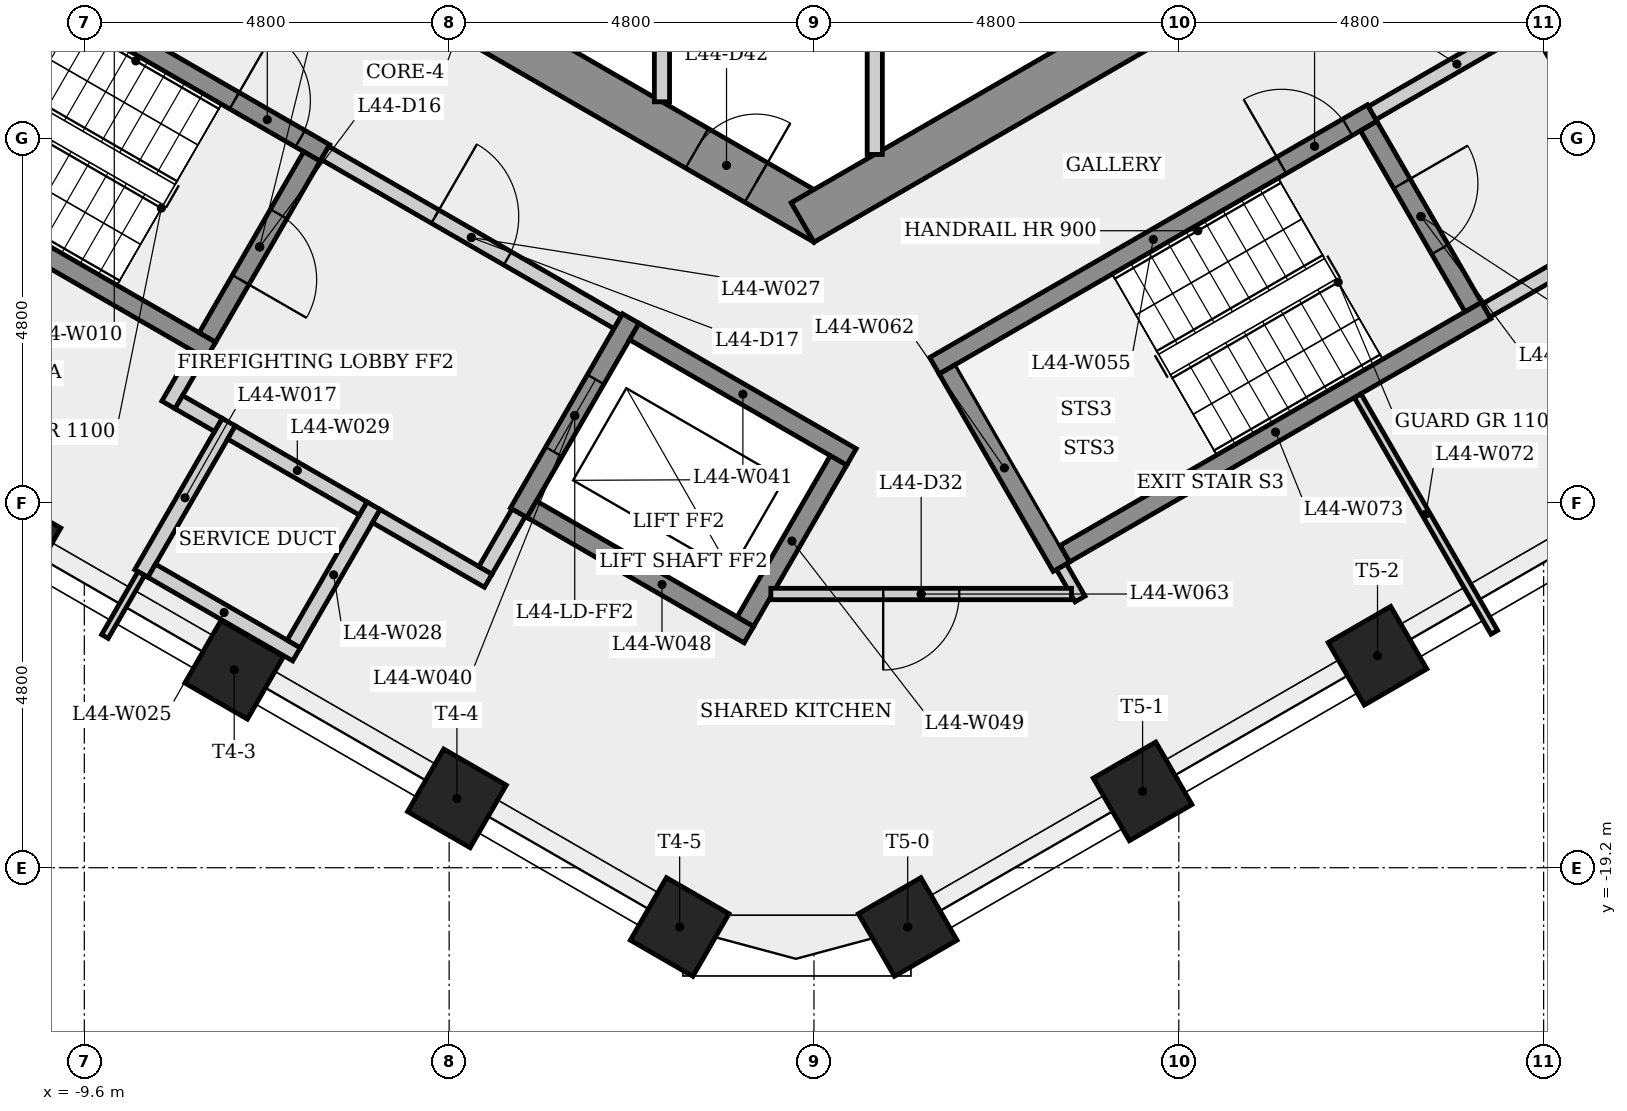
"""IFC4 building model, lengths in metres.
Left out: names, types, materials, properties, quantities, classifications, styles, units other than length and angle.
Written with IfcOpenShell. Run it as: python <this file> out.ifc"""

import sys

from ifc_helpers import new_model, si_unit, direction, frame, frame_2d, origin, origin_2d, place, context, subcontext, project, spatial, rectangle, extrude, element, fill, save


model = new_model("IFC4")
c1 = context("Model", 3, precision=1e-05, world=origin(), true_north=direction((0.0, 1.0)))
c2 = subcontext(c1, "Body", "Model", "MODEL_VIEW")
j1 = project(units=[si_unit("LENGTHUNIT", "METRE"), si_unit("PLANEANGLEUNIT", "RADIAN")], contexts=[c1])
p1 = place(None, origin())
s1 = spatial("IfcSite", under=j1, at=p1, CompositionType="ELEMENT")
p2 = place(p1, origin())
s2 = spatial("IfcBuilding", under=s1, at=p2, CompositionType="ELEMENT")
p3 = place(p2, frame((0.0, 0.0, 166.3)))
s3 = spatial("IfcBuildingStorey", under=s2, at=p3, CompositionType="ELEMENT", Elevation=166.3)
p4 = place(p3, frame((-9.35, -5.225, 0.0), z_axis=(0.0, 0.0, 1.0), x_axis=(0.866023993627, -0.500002442456, 0.0)))
e1 = element("IfcWall", 1, at=p4, inside=s3, PredefinedType="SHEAR", context=c2, shape_type="SweptSolid", body=[
    extrude(rectangle(XDim=10.97, YDim=0.6, at=frame_2d((5.485, 0.0))), origin(), (0.0, 0.0, 1.0), 3.4),
])
p5 = place(p4, frame((3.891, 0.0, 0.0)))
e2 = element("IfcOpeningElement", 2, at=p5, cuts=e1, PredefinedType="OPENING", context=c2, shape_type="SweptSolid", body=[
    extrude(rectangle(XDim=0.9, YDim=2.1, at=frame_2d((0.45, 1.05))), frame((0.0, 0.31, 0.0), z_axis=(0.0, -1.0, 0.0), x_axis=(1.0, 0.0, 0.0)), (0.0, 0.0, 1.0), 0.62),
])
p6 = place(p4, frame((9.018, 0.0, 0.0)))
e3 = element("IfcOpeningElement", 3, at=p6, cuts=e1, PredefinedType="OPENING", context=c2, shape_type="SweptSolid", body=[
    extrude(rectangle(XDim=0.9, YDim=2.1, at=frame_2d((0.45, 1.05))), frame((0.0, 0.31, 0.0), z_axis=(0.0, -1.0, 0.0), x_axis=(1.0, 0.0, 0.0)), (0.0, 0.0, 1.0), 0.62),
])
p7 = place(p3, frame((-0.15, -10.71, 0.0), z_axis=(0.0, 0.0, 1.0), x_axis=(0.866023993627, 0.500002442456, 0.0)))
e4 = element("IfcWall", 4, at=p7, inside=s3, PredefinedType="SHEAR", context=c2, shape_type="SweptSolid", body=[
    extrude(rectangle(XDim=10.97, YDim=0.6, at=frame_2d((5.485, 0.0))), origin(), (0.0, 0.0, 1.0), 3.4),
])
p8 = place(p7, frame((7.166, 0.0, 0.0)))
e5 = element("IfcOpeningElement", 5, at=p8, cuts=e4, PredefinedType="OPENING", context=c2, shape_type="SweptSolid", body=[
    extrude(rectangle(XDim=0.9, YDim=2.1, at=frame_2d((0.45, 1.05))), frame((0.0, 0.31, 0.0), z_axis=(0.0, -1.0, 0.0), x_axis=(1.0, 0.0, 0.0)), (0.0, 0.0, 1.0), 0.62),
])
for number, where, z_axis, x_axis in (
    (6, (-10.559, -14.904, 0.0), (0.0, 0.0, 1.0), (-0.5, -0.866, 0.0)),
    (7, (-7.628, -16.596, 0.0), (0.0, 0.0, 1.0), (-0.5, -0.866, 0.0)),
    (8, (-4.698, -18.288, 0.0), (0.0, 0.0, 1.0), (-0.5, -0.866, 0.0)),
    (9, (-1.767, -19.98, 0.0), (0.0, 0.0, 1.0), (-0.5, -0.866, 0.0)),
    (10, (1.233, -19.98, 0.0), (0.0, 0.0, 1.0), (0.5, -0.866, 0.0)),
    (11, (4.324, -18.195, 0.0), (0.0, 0.0, 1.0), (0.5, -0.866, 0.0)),
    (12, (7.414, -16.411, 0.0), (0.0, 0.0, 1.0), (0.5, -0.866, 0.0)),
):
    element("IfcColumn", number, at=place(p3, frame(where, z_axis=z_axis, x_axis=x_axis)), inside=s3, PredefinedType="COLUMN", context=c2, shape_type="SweptSolid", body=[
        extrude(rectangle(XDim=0.95, YDim=0.95, at=origin_2d()), origin(), (0.0, 0.0, 1.0), 3.4),
    ])
p9 = place(p3, frame((-11.977, -6.595, 0.0), z_axis=(0.0, 0.0, 1.0), x_axis=(0.866025499775, -0.499999833739, 0.0)))
e13 = element("IfcWall", 13, at=p9, inside=s3, PredefinedType="SHEAR", context=c2, shape_type="SweptSolid", body=[
    extrude(rectangle(XDim=6.4, YDim=0.25, at=frame_2d((3.2, 0.0))), origin(), (0.0, 0.0, 1.0), 3.05),
])
p10 = place(p9, frame((5.025, 0.0, 0.0)))
e14 = element("IfcOpeningElement", 14, at=p10, cuts=e13, PredefinedType="OPENING", context=c2, shape_type="SweptSolid", body=[
    extrude(rectangle(XDim=1.0, YDim=2.1, at=frame_2d((0.5, 1.05))), frame((0.0, 0.135, 0.0), z_axis=(0.0, -1.0, 0.0), x_axis=(1.0, 0.0, 0.0)), (0.0, 0.0, 1.0), 0.27),
])
p11 = place(p3, frame((-8.85, -15.329, 0.0), z_axis=(0.0, 0.0, 1.0), x_axis=(0.500077740698, 0.865980515519, 0.0)))
e15 = element("IfcWall", 15, at=p11, inside=s3, PredefinedType="PLUMBINGWALL", context=c2, shape_type="SweptSolid", body=[
    extrude(rectangle(XDim=2.3, YDim=0.2, at=frame_2d((1.15, 0.0))), origin(), (0.0, 0.0, 1.0), 3.05),
])
p12 = place(p3, frame((-8.85, -15.329, 0.0), z_axis=(0.0, 0.0, 1.0), x_axis=(-0.499950501706, -0.866053979752, 0.0)))
e16 = element("IfcWall", 16, at=p12, inside=s3, PredefinedType="PARTITIONING", context=c2, shape_type="SweptSolid", body=[
    extrude(rectangle(XDim=0.958, YDim=0.1, at=frame_2d((0.479, 0.0))), origin(), (0.0, 0.0, 1.0), 3.05),
])
p13 = place(p3, frame((-8.493, -13.11, 0.0), z_axis=(0.0, 0.0, 1.0), x_axis=(0.500067724834, 0.865986299303, 0.0)))
e17 = element("IfcWall", 17, at=p13, inside=s3, PredefinedType="PARTITIONING", context=c2, shape_type="SweptSolid", body=[
    extrude(rectangle(XDim=0.775, YDim=0.2, at=frame_2d((0.388, 0.0))), origin(), (0.0, 0.0, 1.0), 3.05),
])
p14 = place(p3, frame((-7.935, -12.393, 0.0), z_axis=(0.0, 0.0, 1.0), x_axis=(-0.866025499775, 0.499999833739, 0.0)))
e18 = element("IfcWall", 18, at=p14, inside=s3, PredefinedType="SHEAR", context=c2, shape_type="SweptSolid", body=[
    extrude(rectangle(XDim=6.4, YDim=0.25, at=frame_2d((3.2, 0.0))), origin(), (0.0, 0.0, 1.0), 3.05),
])
p15 = place(p3, frame((-7.836, -13.373, 0.0), z_axis=(0.0, 0.0, 1.0), x_axis=(-0.866232998003, 0.499640263761, 0.0)))
e19 = element("IfcWall", 19, at=p15, inside=s3, PredefinedType="PARTITIONING", context=c2, shape_type="SweptSolid", body=[
    extrude(rectangle(XDim=0.6, YDim=0.2, at=frame_2d((0.3, 0.0))), origin(), (0.0, 0.0, 1.0), 3.05),
])
p16 = place(p3, frame((-6.808, -16.392, 0.0), z_axis=(0.0, 0.0, 1.0), x_axis=(-0.866008176907, 0.50002983664, 0.0)))
e20 = element("IfcWall", 20, at=p16, inside=s3, PredefinedType="PLUMBINGWALL", context=c2, shape_type="SweptSolid", body=[
    extrude(rectangle(XDim=2.2, YDim=0.2, at=frame_2d((1.1, 0.0))), origin(), (0.0, 0.0, 1.0), 3.05),
])
p17 = place(p3, frame((-6.605, -9.841, 0.0), z_axis=(0.0, 0.0, 1.0), x_axis=(-0.499996545922, -0.866027397988, 0.0)))
e21 = element("IfcWall", 21, at=p17, inside=s3, PredefinedType="SHEAR", context=c2, shape_type="SweptSolid", body=[
    extrude(rectangle(XDim=2.75, YDim=0.25, at=frame_2d((1.375, 0.0))), origin(), (0.0, 0.0, 1.0), 3.05),
])
p18 = place(p17, frame((0.875, 0.0, 0.0)))
e22 = element("IfcOpeningElement", 22, at=p18, cuts=e21, PredefinedType="OPENING", context=c2, shape_type="SweptSolid", body=[
    extrude(rectangle(XDim=1.0, YDim=2.1, at=frame_2d((0.5, 1.05))), frame((0.0, 0.135, 0.0), z_axis=(0.0, -1.0, 0.0), x_axis=(1.0, 0.0, 0.0)), (0.0, 0.0, 1.0), 0.27),
])
p19 = place(p3, frame((-6.435, -9.795, 0.0), z_axis=(0.0, 0.0, 1.0), x_axis=(0.866012907634, -0.500021643343, 0.0)))
e23 = element("IfcWall", 23, at=p19, inside=s3, PredefinedType="PARTITIONING", context=c2, shape_type="SweptSolid", body=[
    extrude(rectangle(XDim=4.45, YDim=0.2, at=frame_2d((2.225, 0.0))), origin(), (0.0, 0.0, 1.0), 3.05),
])
p20 = place(p19, frame((1.675, 0.0, 0.0)))
e24 = element("IfcOpeningElement", 24, at=p20, cuts=e23, PredefinedType="OPENING", context=c2, shape_type="SweptSolid", body=[
    extrude(rectangle(XDim=1.1, YDim=2.1, at=frame_2d((0.55, 1.05))), frame((0.0, 0.11, 0.0), z_axis=(0.0, -1.0, 0.0), x_axis=(1.0, 0.0, 0.0)), (0.0, 0.0, 1.0), 0.22),
])
p21 = place(p3, frame((-5.795, -14.437, 0.0), z_axis=(0.0, 0.0, 1.0), x_axis=(-0.500027713859, -0.866009402589, 0.0)))
e25 = element("IfcWall", 25, at=p21, inside=s3, PredefinedType="PLUMBINGWALL", context=c2, shape_type="SweptSolid", body=[
    extrude(rectangle(XDim=2.1, YDim=0.2, at=frame_2d((1.05, 0.0))), origin(), (0.0, 0.0, 1.0), 3.05),
])
p22 = place(p3, frame((-5.931, -14.473, 0.0), z_axis=(0.0, 0.0, 1.0), x_axis=(-0.866041268327, 0.499972520799, 0.0)))
e26 = element("IfcWall", 26, at=p22, inside=s3, PredefinedType="PLUMBINGWALL", context=c2, shape_type="SweptSolid", body=[
    extrude(rectangle(XDim=2.0, YDim=0.2, at=frame_2d((1.0, 0.0))), origin(), (0.0, 0.0, 1.0), 3.05),
])
p23 = place(p3, frame((-4.286, -15.423, 0.0), z_axis=(0.0, 0.0, 1.0), x_axis=(-0.866025371046, 0.500000056704, 0.0)))
e27 = element("IfcWall", 27, at=p23, inside=s3, PredefinedType="PARTITIONING", context=c2, shape_type="SweptSolid", body=[
    extrude(rectangle(XDim=1.7, YDim=0.2, at=frame_2d((0.85, 0.0))), origin(), (0.0, 0.0, 1.0), 3.05),
])
p24 = place(p3, frame((-3.885, -14.529, 0.0), z_axis=(0.0, 0.0, 1.0), x_axis=(-0.499859285417, -0.866106630146, 0.0)))
e28 = element("IfcWall", 28, at=p24, inside=s3, PredefinedType="PARTITIONING", context=c2, shape_type="SweptSolid", body=[
    extrude(rectangle(XDim=0.875, YDim=0.2, at=frame_2d((0.438, 0.0))), origin(), (0.0, 0.0, 1.0), 3.05),
])
p25 = place(p3, frame((-2.41, -11.974, 0.0), z_axis=(0.0, 0.0, 1.0), x_axis=(-0.500001826776, -0.866024349092, 0.0)))
e29 = element("IfcWall", 29, at=p25, inside=s3, PredefinedType="SHEAR", context=c2, shape_type="SweptSolid", body=[
    extrude(rectangle(XDim=2.95, YDim=0.25, at=frame_2d((1.475, 0.0))), origin(), (0.0, 0.0, 1.0), 3.05),
])
p26 = place(p25, frame((0.925, 0.0, 0.0)))
e30 = element("IfcOpeningElement", 30, at=p26, cuts=e29, PredefinedType="OPENING", context=c2, shape_type="SweptSolid", body=[
    extrude(rectangle(XDim=1.1, YDim=2.1, at=frame_2d((0.55, 1.05))), frame((0.0, 0.135, 0.0), z_axis=(0.0, -1.0, 0.0), x_axis=(1.0, 0.0, 0.0)), (0.0, 0.0, 1.0), 0.27),
])
p27 = place(p3, frame((-2.364, -12.145, 0.0), z_axis=(0.0, 0.0, 1.0), x_axis=(0.866040211805, -0.499974350878, 0.0)))
e31 = element("IfcWall", 31, at=p27, inside=s3, PredefinedType="SHEAR", context=c2, shape_type="SweptSolid", body=[
    extrude(rectangle(XDim=3.3, YDim=0.25, at=frame_2d((1.65, 0.0))), origin(), (0.0, 0.0, 1.0), 3.05),
])
p28 = place(p3, frame((-2.0, -5.25, 0.0), z_axis=(0.0, 0.0, 1.0), x_axis=(0.0, -1.0, 0.0)))
e32 = element("IfcWall", 32, at=p28, inside=s3, PredefinedType="PARTITIONING", context=c2, shape_type="SweptSolid", body=[
    extrude(rectangle(XDim=3.872, YDim=0.2, at=frame_2d((1.936, 0.0))), origin(), (0.0, 0.0, 1.0), 3.05),
])
p29 = place(p3, frame((-0.856, -16.133, 0.0), z_axis=(0.0, 0.0, 1.0), x_axis=(-0.866021716278, 0.500006386895, 0.0)))
e33 = element("IfcWall", 33, at=p29, inside=s3, PredefinedType="SHEAR", context=c2, shape_type="SweptSolid", body=[
    extrude(rectangle(XDim=3.3, YDim=0.25, at=frame_2d((1.65, 0.0))), origin(), (0.0, 0.0, 1.0), 3.05),
])
p30 = place(p3, frame((-0.902, -15.962, 0.0), z_axis=(0.0, 0.0, 1.0), x_axis=(0.500061746146, 0.865989751695, 0.0)))
e34 = element("IfcWall", 34, at=p30, inside=s3, PredefinedType="SHEAR", context=c2, shape_type="SweptSolid", body=[
    extrude(rectangle(XDim=2.45, YDim=0.25, at=frame_2d((1.225, 0.0))), origin(), (0.0, 0.0, 1.0), 3.4),
])
p31 = place(p3, frame((0.8, -5.25, 0.0), z_axis=(0.0, 0.0, 1.0), x_axis=(0.0, -1.0, 0.0)))
e35 = element("IfcWall", 35, at=p31, inside=s3, PredefinedType="PARTITIONING", context=c2, shape_type="SweptSolid", body=[
    extrude(rectangle(XDim=4.565, YDim=0.2, at=frame_2d((2.282, 0.0))), origin(), (0.0, 0.0, 1.0), 3.05),
])
p32 = place(p3, frame((1.585, -12.595, 0.0), z_axis=(0.0, 0.0, 1.0), x_axis=(0.866036417653, 0.499980922934, 0.0)))
e36 = element("IfcWall", 36, at=p32, inside=s3, PredefinedType="SHEAR", context=c2, shape_type="SweptSolid", body=[
    extrude(rectangle(XDim=6.65, YDim=0.25, at=frame_2d((3.325, 0.0))), origin(), (0.0, 0.0, 1.0), 3.05),
])
p33 = place(p32, frame((5.275, 0.0, 0.0)))
e37 = element("IfcOpeningElement", 37, at=p33, cuts=e36, PredefinedType="OPENING", context=c2, shape_type="SweptSolid", body=[
    extrude(rectangle(XDim=1.0, YDim=2.1, at=frame_2d((0.5, 1.05))), frame((0.0, 0.135, 0.0), z_axis=(0.0, -1.0, 0.0), x_axis=(1.0, 0.0, 0.0)), (0.0, 0.0, 1.0), 0.27),
])
p34 = place(p3, frame((3.256, -15.239, 0.0), z_axis=(0.0, 0.0, 1.0), x_axis=(0.499937760689, -0.866061334686, 0.0)))
e38 = element("IfcWall", 38, at=p34, inside=s3, PredefinedType="PARTITIONING", context=c2, shape_type="SweptSolid", body=[
    extrude(rectangle(XDim=0.491, YDim=0.15, at=frame_2d((0.245, 0.0))), origin(), (0.0, 0.0, 1.0), 3.05),
])
p35 = place(p3, frame((3.256, -15.239, 0.0), z_axis=(0.0, 0.0, 1.0), x_axis=(-0.50002537861, 0.866010750942, 0.0)))
e39 = element("IfcWall", 39, at=p35, inside=s3, PredefinedType="SHEAR", context=c2, shape_type="SweptSolid", body=[
    extrude(rectangle(XDim=3.0, YDim=0.25, at=frame_2d((1.5, 0.0))), origin(), (0.0, 0.0, 1.0), 3.05),
])
p36 = place(p3, frame((3.388, -15.599, 0.0), z_axis=(0.0, 0.0, 1.0), x_axis=(-1.0, 0.0, 0.0)))
e40 = element("IfcWall", 40, at=p36, inside=s3, PredefinedType="PARTITIONING", context=c2, shape_type="SweptSolid", body=[
    extrude(rectangle(XDim=3.956, YDim=0.15, at=frame_2d((1.978, 0.0))), origin(), (0.0, 0.0, 1.0), 3.05),
])
p37 = place(p36, frame((1.478, 0.0, 0.0)))
e41 = element("IfcOpeningElement", 41, at=p37, cuts=e40, PredefinedType="OPENING", context=c2, shape_type="SweptSolid", body=[
    extrude(rectangle(XDim=1.0, YDim=2.1, at=frame_2d((0.5, 1.05))), frame((0.0, 0.085, 0.0), z_axis=(0.0, -1.0, 0.0), x_axis=(1.0, 0.0, 0.0)), (0.0, 0.0, 1.0), 0.17),
])
p38 = place(p3, frame((7.153, -12.989, 0.0), z_axis=(0.0, 0.0, 1.0), x_axis=(0.500002649256, -0.86602387423, 0.0)))
e42 = element("IfcWall", 42, at=p38, inside=s3, PredefinedType="PARTITIONING", context=c2, shape_type="SweptSolid", body=[
    extrude(rectangle(XDim=3.595, YDim=0.1, at=frame_2d((1.798, 0.0))), origin(), (0.0, 0.0, 1.0), 3.05),
])
p39 = place(p3, frame((3.301, -15.068, 0.0), z_axis=(0.0, 0.0, 1.0), x_axis=(0.866035036182, 0.499983315828, 0.0)))
e43 = element("IfcWall", 43, at=p39, inside=s3, PredefinedType="SHEAR", context=c2, shape_type="SweptSolid", body=[
    extrude(rectangle(XDim=6.4, YDim=0.25, at=frame_2d((3.2, 0.0))), origin(), (0.0, 0.0, 1.0), 3.05),
])
p40 = place(p3, frame((7.298, -9.441, 0.0), z_axis=(0.0, 0.0, 1.0), x_axis=(0.500034990121, -0.866005201286, 0.0)))
e44 = element("IfcWall", 44, at=p40, inside=s3, PredefinedType="SHEAR", context=c2, shape_type="SweptSolid", body=[
    extrude(rectangle(XDim=2.75, YDim=0.25, at=frame_2d((1.375, 0.0))), origin(), (0.0, 0.0, 1.0), 3.05),
])
p41 = place(p40, frame((0.875, 0.0, 0.0)))
e45 = element("IfcOpeningElement", 45, at=p41, cuts=e44, PredefinedType="OPENING", context=c2, shape_type="SweptSolid", body=[
    extrude(rectangle(XDim=1.0, YDim=2.1, at=frame_2d((0.5, 1.05))), frame((0.0, 0.135, 0.0), z_axis=(0.0, -1.0, 0.0), x_axis=(1.0, 0.0, 0.0)), (0.0, 0.0, 1.0), 0.27),
])
p42 = place(p3, frame((7.344, -9.27, 0.0), z_axis=(0.0, 0.0, 1.0), x_axis=(0.866005588531, 0.500034319456, 0.0)))
e46 = element("IfcWall", 46, at=p42, inside=s3, PredefinedType="PARTITIONING", context=c2, shape_type="SweptSolid", body=[
    extrude(rectangle(XDim=2.575, YDim=0.2, at=frame_2d((1.288, 0.0))), origin(), (0.0, 0.0, 1.0), 3.05),
])
p43 = place(p3, frame((9.537, -8.119, 0.0), z_axis=(0.0, 0.0, 1.0), x_axis=(0.499990139034, -0.866031096941, 0.0)))
e47 = element("IfcWall", 47, at=p43, inside=s3, PredefinedType="PARTITIONING", context=c2, shape_type="SweptSolid", body=[
    extrude(rectangle(XDim=3.0, YDim=0.2, at=frame_2d((1.5, 0.0))), origin(), (0.0, 0.0, 1.0), 3.05),
])
p44 = place(p43, frame((0.935, 0.0, 0.0)))
e48 = element("IfcOpeningElement", 48, at=p44, cuts=e47, PredefinedType="OPENING", context=c2, shape_type="SweptSolid", body=[
    extrude(rectangle(XDim=1.0, YDim=2.1, at=frame_2d((0.5, 1.05))), frame((0.0, 0.11, 0.0), z_axis=(0.0, -1.0, 0.0), x_axis=(1.0, 0.0, 0.0)), (0.0, 0.0, 1.0), 0.22),
])
p45 = place(p3, frame((10.901, -10.681, 0.0), z_axis=(0.0, 0.0, 1.0), x_axis=(-0.866007538022, -0.500030943131, 0.0)))
e49 = element("IfcWall", 49, at=p45, inside=s3, PredefinedType="PARTITIONING", context=c2, shape_type="SweptSolid", body=[
    extrude(rectangle(XDim=2.375, YDim=0.2, at=frame_2d((1.188, 0.0))), origin(), (0.0, 0.0, 1.0), 3.05),
])
p46 = place(p10, origin())
e50 = element("IfcDoor", 50, at=p46, inside=s3, OperationType="SINGLE_SWING_LEFT", PredefinedType="DOOR", context=c2, shape_type="SweptSolid", body=[
    extrude(rectangle(XDim=1.0, YDim=2.1, at=frame_2d((0.5, 1.05))), frame((0.0, 0.025, 0.0), z_axis=(0.0, -1.0, 0.0), x_axis=(1.0, 0.0, 0.0)), (0.0, 0.0, 1.0), 0.05),
])
fill(e14, e50)
p47 = place(p18, origin())
e51 = element("IfcDoor", 51, at=p47, inside=s3, OperationType="SINGLE_SWING_RIGHT", PredefinedType="DOOR", context=c2, shape_type="SweptSolid", body=[
    extrude(rectangle(XDim=1.0, YDim=2.1, at=frame_2d((0.5, 1.05))), frame((0.0, 0.025, 0.0), z_axis=(0.0, -1.0, 0.0), x_axis=(1.0, 0.0, 0.0)), (0.0, 0.0, 1.0), 0.05),
])
fill(e22, e51)
p48 = place(p20, origin())
e52 = element("IfcDoor", 52, at=p48, inside=s3, OperationType="SINGLE_SWING_LEFT", PredefinedType="DOOR", context=c2, shape_type="SweptSolid", body=[
    extrude(rectangle(XDim=1.1, YDim=2.1, at=frame_2d((0.55, 1.05))), frame((0.0, 0.025, 0.0), z_axis=(0.0, -1.0, 0.0), x_axis=(1.0, 0.0, 0.0)), (0.0, 0.0, 1.0), 0.05),
])
fill(e24, e52)
p49 = place(p26, origin())
e53 = element("IfcDoor", 53, at=p49, inside=s3, OperationType="SLIDING_TO_LEFT", PredefinedType="DOOR", context=c2, shape_type="SweptSolid", body=[
    extrude(rectangle(XDim=1.1, YDim=2.1, at=frame_2d((0.55, 1.05))), frame((0.0, 0.025, 0.0), z_axis=(0.0, -1.0, 0.0), x_axis=(1.0, 0.0, 0.0)), (0.0, 0.0, 1.0), 0.05),
])
fill(e30, e53)
p50 = place(p33, origin())
e54 = element("IfcDoor", 54, at=p50, inside=s3, OperationType="SINGLE_SWING_LEFT", PredefinedType="DOOR", context=c2, shape_type="SweptSolid", body=[
    extrude(rectangle(XDim=1.0, YDim=2.1, at=frame_2d((0.5, 1.05))), frame((0.0, 0.025, 0.0), z_axis=(0.0, -1.0, 0.0), x_axis=(1.0, 0.0, 0.0)), (0.0, 0.0, 1.0), 0.05),
])
fill(e37, e54)
p51 = place(p41, origin())
e55 = element("IfcDoor", 55, at=p51, inside=s3, OperationType="SINGLE_SWING_LEFT", PredefinedType="DOOR", context=c2, shape_type="SweptSolid", body=[
    extrude(rectangle(XDim=1.0, YDim=2.1, at=frame_2d((0.5, 1.05))), frame((0.0, 0.025, 0.0), z_axis=(0.0, -1.0, 0.0), x_axis=(1.0, 0.0, 0.0)), (0.0, 0.0, 1.0), 0.05),
])
fill(e45, e55)
p52 = place(p37, origin())
e56 = element("IfcDoor", 56, at=p52, inside=s3, OperationType="SINGLE_SWING_RIGHT", PredefinedType="DOOR", context=c2, shape_type="SweptSolid", body=[
    extrude(rectangle(XDim=1.0, YDim=2.1, at=frame_2d((0.5, 1.05))), frame((0.0, 0.025, 0.0), z_axis=(0.0, -1.0, 0.0), x_axis=(1.0, 0.0, 0.0)), (0.0, 0.0, 1.0), 0.05),
])
fill(e41, e56)
p53 = place(p6, origin())
e57 = element("IfcDoor", 57, at=p53, inside=s3, OperationType="SINGLE_SWING_RIGHT", PredefinedType="DOOR", context=c2, shape_type="SweptSolid", body=[
    extrude(rectangle(XDim=0.9, YDim=2.1, at=frame_2d((0.45, 1.05))), frame((0.0, 0.025, 0.0), z_axis=(0.0, -1.0, 0.0), x_axis=(1.0, 0.0, 0.0)), (0.0, 0.0, 1.0), 0.05),
])
fill(e3, e57)
save(model, sys.argv[1])
